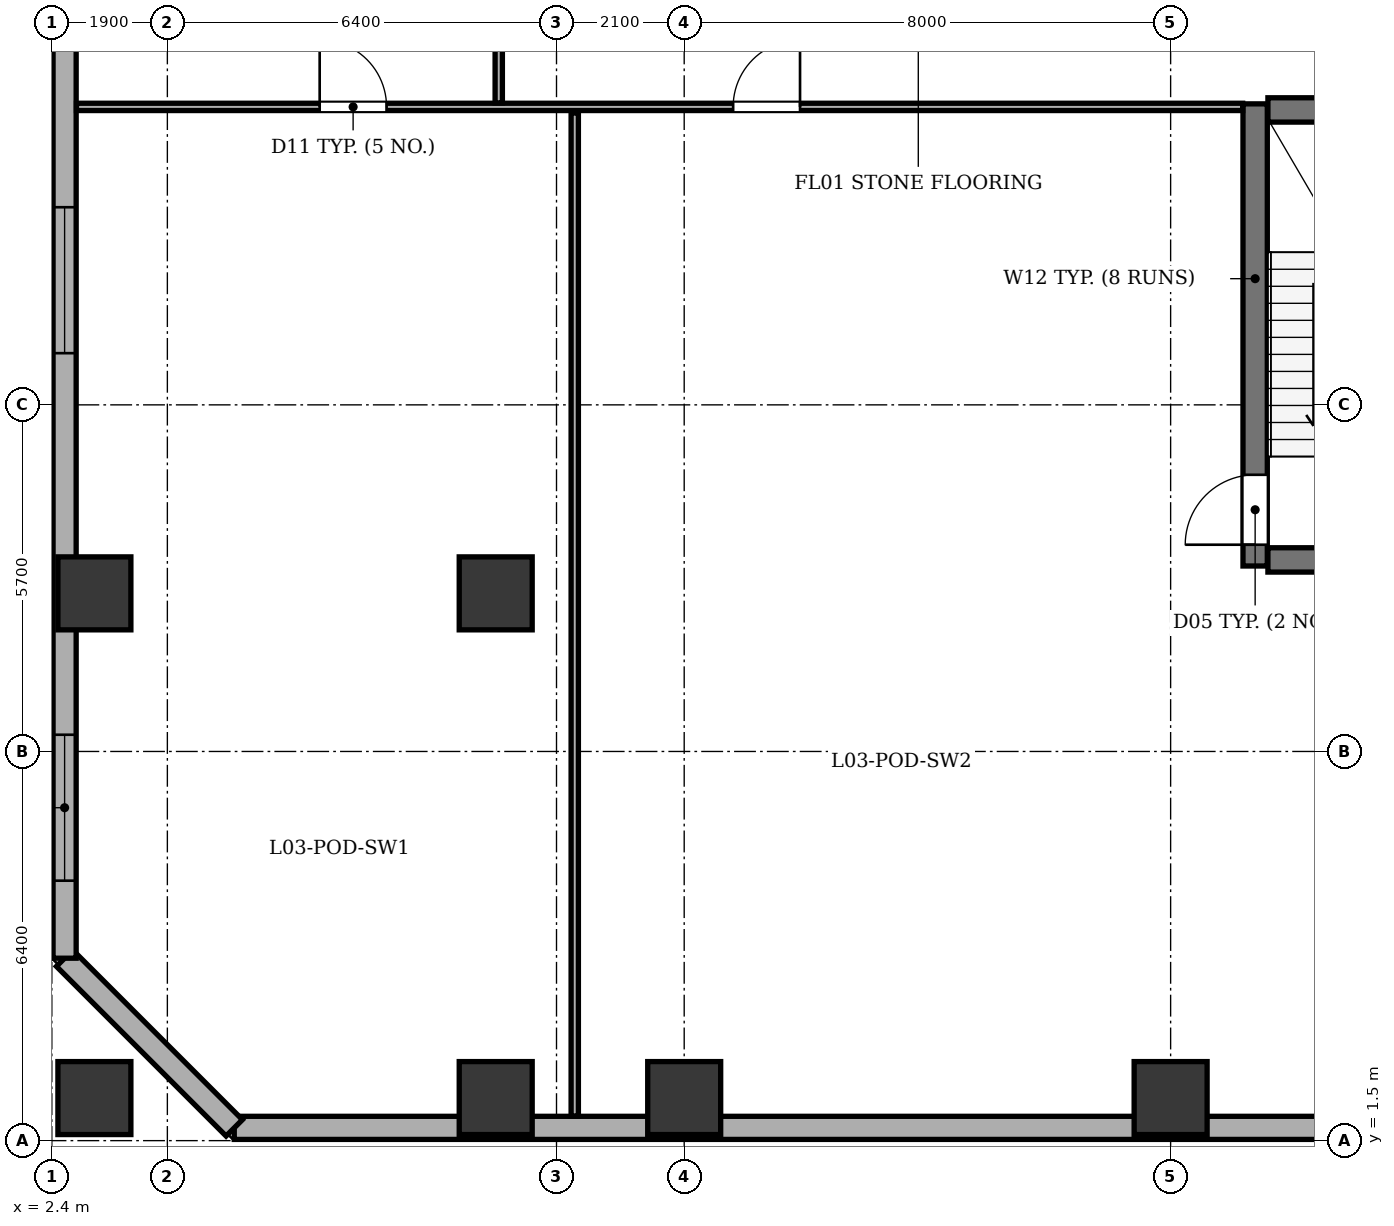
"""IFC4 building model, lengths in metres.
Left out: names, types, materials, properties, quantities, classifications, styles, units other than length and angle.
Written with IfcOpenShell. Run it as: python <this file> out.ifc"""

import sys

from ifc_helpers import new_model, si_unit, direction, frame, frame_2d, origin, origin_2d, place, context, subcontext, project, spatial, rectangle, extrude, element, fill, save


model = new_model("IFC4")
c1 = context("Model", 3, precision=1e-05, world=origin(), true_north=direction((0.0, 1.0)))
c2 = subcontext(c1, "Body", "Model", "MODEL_VIEW")
j1 = project(units=[si_unit("LENGTHUNIT", "METRE"), si_unit("PLANEANGLEUNIT", "RADIAN")], contexts=[c1])
p1 = place(None, origin())
s1 = spatial("IfcSite", under=j1, at=p1, CompositionType="ELEMENT")
p2 = place(p1, origin())
s2 = spatial("IfcBuilding", under=s1, at=p2, CompositionType="ELEMENT")
p3 = place(p2, frame((0.0, 0.0, 14.4)))
s3 = spatial("IfcBuildingStorey", under=s2, at=p3, CompositionType="ELEMENT", Elevation=14.4)
for number, where, z_axis, x_axis in (
    (1, (3.1, 2.2, 0.0), (0.0, 0.0, 1.0), (1.0, 0.0, 0.0)),
    (2, (9.7, 2.2, 0.0), (0.0, 0.0, 1.0), (1.0, 0.0, 0.0)),
    (3, (12.8, 2.2, 0.0), (0.0, 0.0, 1.0), (1.0, 0.0, 0.0)),
    (4, (20.8, 2.2, 0.0), (0.0, 0.0, 1.0), (1.0, 0.0, 0.0)),
    (5, (3.1, 10.5, 0.0), (0.0, 0.0, 1.0), (1.0, 0.0, 0.0)),
    (6, (9.7, 10.5, 0.0), (0.0, 0.0, 1.0), (1.0, 0.0, 0.0)),
):
    element("IfcColumn", number, at=place(p3, frame(where, z_axis=z_axis, x_axis=x_axis)), inside=s3, PredefinedType="COLUMN", context=c2, shape_type="SweptSolid", body=[
        extrude(rectangle(XDim=1.2, YDim=1.2, at=origin_2d()), origin(), (0.0, 0.0, 1.0), 4.5),
    ])
p4 = place(p3, frame((37.55, 1.71, 0.0), z_axis=(0.0, 0.0, 1.0), x_axis=(-1.0, 0.0, 0.0)))
e7 = element("IfcWall", 7, at=p4, inside=s3, PredefinedType="STANDARD", context=c2, shape_type="SweptSolid", body=[
    extrude(rectangle(XDim=32.15, YDim=0.38, at=frame_2d((16.075, 0.0))), origin(), (0.0, 0.0, 1.0), 4.0),
])
p5 = place(p3, frame((5.4, 1.71, 0.0), z_axis=(0.0, 0.0, 1.0), x_axis=(-0.707075841688, 0.707137719332, 0.0)))
e8 = element("IfcWall", 8, at=p5, inside=s3, PredefinedType="STANDARD", context=c2, shape_type="SweptSolid", body=[
    extrude(rectangle(XDim=3.946, YDim=0.38, at=frame_2d((1.973, 0.0))), origin(), (0.0, 0.0, 1.0), 4.0),
])
p6 = place(p3, frame((2.61, 4.5, 0.0), z_axis=(0.0, 0.0, 1.0), x_axis=(0.0, 1.0, 0.0)))
e9 = element("IfcWall", 9, at=p6, inside=s3, PredefinedType="STANDARD", context=c2, shape_type="SweptSolid", body=[
    extrude(rectangle(XDim=45.4, YDim=0.38, at=frame_2d((22.7, 0.0))), origin(), (0.0, 0.0, 1.0), 4.0),
])
p7 = place(p6, frame((1.275, 0.0, 0.75)))
e10 = element("IfcOpeningElement", 10, at=p7, cuts=e9, PredefinedType="OPENING", context=c2, shape_type="SweptSolid", body=[
    extrude(rectangle(XDim=2.4, YDim=2.1, at=frame_2d((1.2, 1.05))), frame((0.0, 0.2, 0.0), z_axis=(0.0, -1.0, 0.0), x_axis=(1.0, 0.0, 0.0)), (0.0, 0.0, 1.0), 0.4),
])
p8 = place(p6, frame((9.95, 0.0, 0.75)))
e11 = element("IfcOpeningElement", 11, at=p8, cuts=e9, PredefinedType="OPENING", context=c2, shape_type="SweptSolid", body=[
    extrude(rectangle(XDim=2.4, YDim=2.1, at=frame_2d((1.2, 1.05))), frame((0.0, 0.2, 0.0), z_axis=(0.0, -1.0, 0.0), x_axis=(1.0, 0.0, 0.0)), (0.0, 0.0, 1.0), 0.4),
])
p9 = place(p6, frame((18.3, 0.0, 0.75)))
e12 = element("IfcOpeningElement", 12, at=p9, cuts=e9, PredefinedType="OPENING", context=c2, shape_type="SweptSolid", body=[
    extrude(rectangle(XDim=2.4, YDim=2.1, at=frame_2d((1.2, 1.05))), frame((0.0, 0.2, 0.0), z_axis=(0.0, -1.0, 0.0), x_axis=(1.0, 0.0, 0.0)), (0.0, 0.0, 1.0), 0.4),
])
p10 = place(p6, frame((24.7, 0.0, 0.75)))
e13 = element("IfcOpeningElement", 13, at=p10, cuts=e9, PredefinedType="OPENING", context=c2, shape_type="SweptSolid", body=[
    extrude(rectangle(XDim=2.4, YDim=2.1, at=frame_2d((1.2, 1.05))), frame((0.0, 0.2, 0.0), z_axis=(0.0, -1.0, 0.0), x_axis=(1.0, 0.0, 0.0)), (0.0, 0.0, 1.0), 0.4),
])
p11 = place(p6, frame((33.05, 0.0, 0.75)))
e14 = element("IfcOpeningElement", 14, at=p11, cuts=e9, PredefinedType="OPENING", context=c2, shape_type="SweptSolid", body=[
    extrude(rectangle(XDim=2.4, YDim=2.1, at=frame_2d((1.2, 1.05))), frame((0.0, 0.2, 0.0), z_axis=(0.0, -1.0, 0.0), x_axis=(1.0, 0.0, 0.0)), (0.0, 0.0, 1.0), 0.4),
])
p12 = place(p6, frame((41.725, 0.0, 0.75)))
e15 = element("IfcOpeningElement", 15, at=p12, cuts=e9, PredefinedType="OPENING", context=c2, shape_type="SweptSolid", body=[
    extrude(rectangle(XDim=2.4, YDim=2.1, at=frame_2d((1.2, 1.05))), frame((0.0, 0.2, 0.0), z_axis=(0.0, -1.0, 0.0), x_axis=(1.0, 0.0, 0.0)), (0.0, 0.0, 1.0), 0.4),
])
p13 = place(p3, frame((22.19, 10.95, 0.0), z_axis=(0.0, 0.0, 1.0), x_axis=(0.0, 1.0, 0.0)))
e16 = element("IfcWall", 16, at=p13, inside=s3, PredefinedType="SHEAR", context=c2, shape_type="SweptSolid", body=[
    extrude(rectangle(XDim=7.6, YDim=0.4, at=frame_2d((3.8, 0.0))), origin(), (0.0, 0.0, 1.0), 4.0),
])
p14 = place(p13, frame((0.35, 0.0, 0.0)))
e17 = element("IfcOpeningElement", 17, at=p14, cuts=e16, PredefinedType="OPENING", context=c2, shape_type="SweptSolid", body=[
    extrude(rectangle(XDim=1.15, YDim=2.15, at=frame_2d((0.575, 1.075))), frame((0.0, 0.21, 0.0), z_axis=(0.0, -1.0, 0.0), x_axis=(1.0, 0.0, 0.0)), (0.0, 0.0, 1.0), 0.42),
])
for number, where, z_axis, x_axis in (
    (18, (22.4, 11.05, 0.0), (0.0, 0.0, 1.0), (1.0, 0.0, 0.0)),
    (19, (22.4, 18.45, 0.0), (0.0, 0.0, 1.0), (1.0, 0.0, 0.0)),
):
    element("IfcWall", number, at=place(p3, frame(where, z_axis=z_axis, x_axis=x_axis)), inside=s3, PredefinedType="SHEAR", context=c2, shape_type="SweptSolid", body=[
        extrude(rectangle(XDim=3.2, YDim=0.4, at=frame_2d((1.6, 0.0))), origin(), (0.0, 0.0, 1.0), 4.0),
    ])
p15 = place(p3, frame((2.805, 18.5, 0.0), z_axis=(0.0, 0.0, 1.0), x_axis=(1.0, 0.0, 0.0)))
e20 = element("IfcWall", 20, at=p15, inside=s3, PredefinedType="PARTITIONING", context=c2, shape_type="SweptSolid", body=[
    extrude(rectangle(XDim=19.18, YDim=0.12, at=frame_2d((9.59, 0.0))), origin(), (0.0, 0.0, 1.0), 3.435),
])
p16 = place(p15, frame((4.0, 0.0, 0.0)))
e21 = element("IfcOpeningElement", 21, at=p16, cuts=e20, PredefinedType="OPENING", context=c2, shape_type="SweptSolid", body=[
    extrude(rectangle(XDim=1.1, YDim=2.15, at=frame_2d((0.55, 1.075))), frame((0.0, 0.07, 0.0), z_axis=(0.0, -1.0, 0.0), x_axis=(1.0, 0.0, 0.0)), (0.0, 0.0, 1.0), 0.14),
])
p17 = place(p15, frame((10.8, 0.0, 0.0)))
e22 = element("IfcOpeningElement", 22, at=p17, cuts=e20, PredefinedType="OPENING", context=c2, shape_type="SweptSolid", body=[
    extrude(rectangle(XDim=1.1, YDim=2.15, at=frame_2d((0.55, 1.075))), frame((0.0, 0.07, 0.0), z_axis=(0.0, -1.0, 0.0), x_axis=(1.0, 0.0, 0.0)), (0.0, 0.0, 1.0), 0.14),
])
p18 = place(p3, frame((11.0, 1.905, 0.0), z_axis=(0.0, 0.0, 1.0), x_axis=(0.0, 1.0, 0.0)))
e23 = element("IfcWall", 23, at=p18, inside=s3, PredefinedType="PARTITIONING", context=c2, shape_type="SweptSolid", body=[
    extrude(rectangle(XDim=16.495, YDim=0.12, at=frame_2d((8.248, 0.0))), origin(), (0.0, 0.0, 1.0), 4.0),
])
p19 = place(p3, frame((9.75, 18.565, 0.0), z_axis=(0.0, 0.0, 1.0), x_axis=(0.0, 1.0, 0.0)))
e24 = element("IfcWall", 24, at=p19, inside=s3, PredefinedType="PARTITIONING", context=c2, shape_type="SweptSolid", body=[
    extrude(rectangle(XDim=19.72, YDim=0.12, at=frame_2d((9.86, 0.0))), origin(), (0.0, 0.0, 1.0), 2.185),
])
p20 = place(p19, frame((7.985, 0.0, 0.0)))
e25 = element("IfcOpeningElement", 25, at=p20, cuts=e24, PredefinedType="OPENING", context=c2, shape_type="SweptSolid", body=[
    extrude(rectangle(XDim=1.0, YDim=2.1, at=frame_2d((0.5, 1.05))), frame((0.0, 0.07, 0.0), z_axis=(0.0, -1.0, 0.0), x_axis=(1.0, 0.0, 0.0)), (0.0, 0.0, 1.0), 0.14),
])
p21 = place(p7, origin())
e26 = element("IfcWindow", 26, at=p21, inside=s3, PartitioningType="SINGLE_PANEL", PredefinedType="WINDOW", context=c2, shape_type="SweptSolid", body=[
    extrude(rectangle(XDim=2.4, YDim=2.1, at=frame_2d((1.2, 1.05))), frame((0.0, 0.03, 0.0), z_axis=(0.0, -1.0, 0.0), x_axis=(1.0, 0.0, 0.0)), (0.0, 0.0, 1.0), 0.06),
])
fill(e10, e26)
p22 = place(p8, origin())
e27 = element("IfcWindow", 27, at=p22, inside=s3, PartitioningType="SINGLE_PANEL", PredefinedType="WINDOW", context=c2, shape_type="SweptSolid", body=[
    extrude(rectangle(XDim=2.4, YDim=2.1, at=frame_2d((1.2, 1.05))), frame((0.0, 0.03, 0.0), z_axis=(0.0, -1.0, 0.0), x_axis=(1.0, 0.0, 0.0)), (0.0, 0.0, 1.0), 0.06),
])
fill(e11, e27)
p23 = place(p14, origin())
e28 = element("IfcDoor", 28, at=p23, inside=s3, OperationType="SINGLE_SWING_LEFT", PredefinedType="DOOR", context=c2, shape_type="SweptSolid", body=[
    extrude(rectangle(XDim=1.15, YDim=2.15, at=frame_2d((0.575, 1.075))), frame((0.0, 0.025, 0.0), z_axis=(0.0, -1.0, 0.0), x_axis=(1.0, 0.0, 0.0)), (0.0, 0.0, 1.0), 0.05),
])
fill(e17, e28)
p24 = place(p16, origin())
e29 = element("IfcDoor", 29, at=p24, inside=s3, OperationType="SINGLE_SWING_LEFT", PredefinedType="DOOR", context=c2, shape_type="SweptSolid", body=[
    extrude(rectangle(XDim=1.1, YDim=2.15, at=frame_2d((0.55, 1.075))), frame((0.0, 0.025, 0.0), z_axis=(0.0, -1.0, 0.0), x_axis=(1.0, 0.0, 0.0)), (0.0, 0.0, 1.0), 0.05),
])
fill(e21, e29)
p25 = place(p17, origin())
e30 = element("IfcDoor", 30, at=p25, inside=s3, OperationType="SINGLE_SWING_RIGHT", PredefinedType="DOOR", context=c2, shape_type="SweptSolid", body=[
    extrude(rectangle(XDim=1.1, YDim=2.15, at=frame_2d((0.55, 1.075))), frame((0.0, 0.025, 0.0), z_axis=(0.0, -1.0, 0.0), x_axis=(1.0, 0.0, 0.0)), (0.0, 0.0, 1.0), 0.05),
])
fill(e22, e30)
save(model, sys.argv[1])
